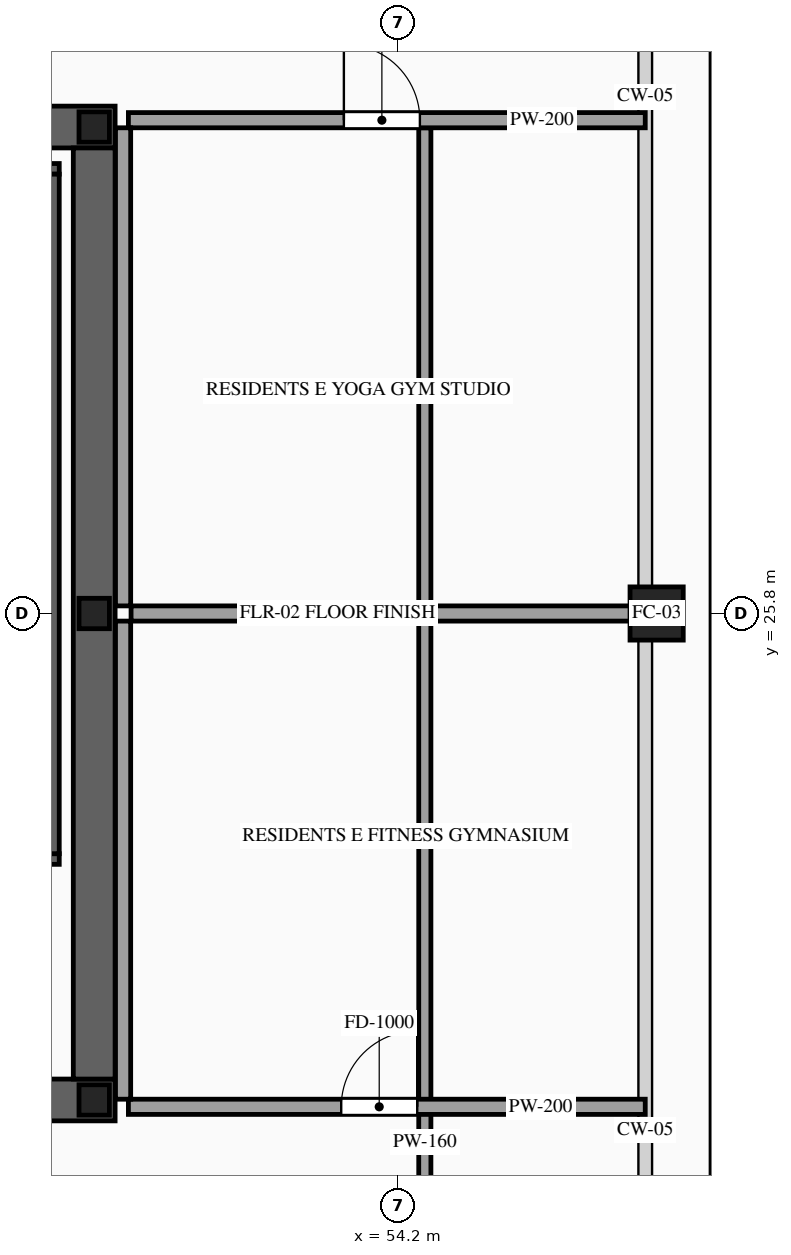
"""IFC4 building model, lengths in metres.
Left out: names, types, materials, properties, quantities, classifications, styles, units other than length and angle.
Written with IfcOpenShell. Run it as: python <this file> out.ifc"""

import sys

from ifc_helpers import new_model, si_unit, direction, frame, frame_2d, origin, origin_2d, place, context, subcontext, project, spatial, rectangle, hollow_rectangle, i_section, extrude, source, transform, mapped, element, fill, save


model = new_model("IFC4")
c1 = context("Model", 3, precision=1e-05, world=origin(), true_north=direction((0.0, 1.0)))
c2 = subcontext(c1, "Body", "Model", "MODEL_VIEW")
j1 = project(units=[si_unit("LENGTHUNIT", "METRE"), si_unit("PLANEANGLEUNIT", "RADIAN")], contexts=[c1])
p1 = place(None, origin())
s1 = spatial("IfcSite", under=j1, at=p1, CompositionType="ELEMENT")
p2 = place(p1, origin())
s2 = spatial("IfcBuilding", under=s1, at=p2, CompositionType="ELEMENT")
p3 = place(p2, frame((0.0, 0.0, 238.1)))
s3 = spatial("IfcBuildingStorey", under=s2, at=p3, CompositionType="ELEMENT", Elevation=238.1)
p4 = place(p3, frame((23.525, 19.4, 0.0), z_axis=(0.0, 0.0, 1.0), x_axis=(1.0, 0.0, 0.0)))
e1 = element("IfcWall", 1, at=p4, inside=s3, PredefinedType="SHEAR", context=c2, shape_type="SweptSolid", body=[
    extrude(rectangle(XDim=26.95, YDim=0.55, at=frame_2d((13.475, 0.0))), origin(), (0.0, 0.0, 1.0), 3.5),
])
p5 = place(p4, frame((1.925, 0.0, 0.0)))
e2 = element("IfcOpeningElement", 2, at=p5, cuts=e1, PredefinedType="OPENING", context=c2, shape_type="SweptSolid", body=[
    extrude(rectangle(XDim=1.1, YDim=2.2, at=frame_2d((0.55, 1.1))), frame((0.0, 0.29, 0.0), z_axis=(0.0, -1.0, 0.0), x_axis=(1.0, 0.0, 0.0)), (0.0, 0.0, 1.0), 0.58),
])
p6 = place(p4, frame((9.825, 0.0, 0.0)))
e3 = element("IfcOpeningElement", 3, at=p6, cuts=e1, PredefinedType="OPENING", context=c2, shape_type="SweptSolid", body=[
    extrude(rectangle(XDim=1.1, YDim=2.2, at=frame_2d((0.55, 1.1))), frame((0.0, 0.29, 0.0), z_axis=(0.0, -1.0, 0.0), x_axis=(1.0, 0.0, 0.0)), (0.0, 0.0, 1.0), 0.58),
])
p7 = place(p4, frame((23.025, 0.0, 0.0)))
e4 = element("IfcOpeningElement", 4, at=p7, cuts=e1, PredefinedType="OPENING", context=c2, shape_type="SweptSolid", body=[
    extrude(rectangle(XDim=1.1, YDim=2.2, at=frame_2d((0.55, 1.1))), frame((0.0, 0.29, 0.0), z_axis=(0.0, -1.0, 0.0), x_axis=(1.0, 0.0, 0.0)), (0.0, 0.0, 1.0), 0.58),
])
p8 = place(p4, frame((19.645, 0.0, 0.0)))
e5 = element("IfcOpeningElement", 5, at=p8, cuts=e1, PredefinedType="OPENING", context=c2, shape_type="SweptSolid", body=[
    extrude(rectangle(XDim=0.9, YDim=2.15, at=frame_2d((0.45, 1.075))), frame((0.0, 0.29, 0.0), z_axis=(0.0, -1.0, 0.0), x_axis=(1.0, 0.0, 0.0)), (0.0, 0.0, 1.0), 0.58),
])
p9 = place(p4, frame((18.205, 0.0, 0.0)))
e6 = element("IfcOpeningElement", 6, at=p9, cuts=e1, PredefinedType="OPENING", context=c2, shape_type="SweptSolid", body=[
    extrude(rectangle(XDim=0.9, YDim=2.15, at=frame_2d((0.45, 1.075))), frame((0.0, 0.29, 0.0), z_axis=(0.0, -1.0, 0.0), x_axis=(1.0, 0.0, 0.0)), (0.0, 0.0, 1.0), 0.58),
])
p10 = place(p3, frame((23.525, 32.2, 0.0), z_axis=(0.0, 0.0, 1.0), x_axis=(1.0, 0.0, 0.0)))
e7 = element("IfcWall", 7, at=p10, inside=s3, PredefinedType="SHEAR", context=c2, shape_type="SweptSolid", body=[
    extrude(rectangle(XDim=26.95, YDim=0.55, at=frame_2d((13.475, 0.0))), origin(), (0.0, 0.0, 1.0), 3.5),
])
p11 = place(p10, frame((4.545, 0.0, 0.0)))
e8 = element("IfcOpeningElement", 8, at=p11, cuts=e7, PredefinedType="OPENING", context=c2, shape_type="SweptSolid", body=[
    extrude(rectangle(XDim=0.9, YDim=2.15, at=frame_2d((0.45, 1.075))), frame((0.0, 0.29, 0.0), z_axis=(0.0, -1.0, 0.0), x_axis=(1.0, 0.0, 0.0)), (0.0, 0.0, 1.0), 0.58),
])
p12 = place(p10, frame((9.825, 0.0, 0.0)))
e9 = element("IfcOpeningElement", 9, at=p12, cuts=e7, PredefinedType="OPENING", context=c2, shape_type="SweptSolid", body=[
    extrude(rectangle(XDim=1.1, YDim=2.2, at=frame_2d((0.55, 1.1))), frame((0.0, 0.29, 0.0), z_axis=(0.0, -1.0, 0.0), x_axis=(1.0, 0.0, 0.0)), (0.0, 0.0, 1.0), 0.58),
])
p13 = place(p10, frame((15.675, 0.0, 0.0)))
e10 = element("IfcOpeningElement", 10, at=p13, cuts=e7, PredefinedType="OPENING", context=c2, shape_type="SweptSolid", body=[
    extrude(rectangle(XDim=1.1, YDim=2.2, at=frame_2d((0.55, 1.1))), frame((0.0, 0.29, 0.0), z_axis=(0.0, -1.0, 0.0), x_axis=(1.0, 0.0, 0.0)), (0.0, 0.0, 1.0), 0.58),
])
p14 = place(p10, frame((18.205, 0.0, 0.0)))
e11 = element("IfcOpeningElement", 11, at=p14, cuts=e7, PredefinedType="OPENING", context=c2, shape_type="SweptSolid", body=[
    extrude(rectangle(XDim=0.9, YDim=2.15, at=frame_2d((0.45, 1.075))), frame((0.0, 0.29, 0.0), z_axis=(0.0, -1.0, 0.0), x_axis=(1.0, 0.0, 0.0)), (0.0, 0.0, 1.0), 0.58),
])
p15 = place(p10, frame((19.645, 0.0, 0.0)))
e12 = element("IfcOpeningElement", 12, at=p15, cuts=e7, PredefinedType="OPENING", context=c2, shape_type="SweptSolid", body=[
    extrude(rectangle(XDim=0.9, YDim=2.15, at=frame_2d((0.45, 1.075))), frame((0.0, 0.29, 0.0), z_axis=(0.0, -1.0, 0.0), x_axis=(1.0, 0.0, 0.0)), (0.0, 0.0, 1.0), 0.58),
])
m1 = source(origin(), c2, "Body", "SweptSolid", [
    extrude(rectangle(XDim=12.25, YDim=0.55, at=frame_2d((6.125, 0.0))), origin(), (0.0, 0.0, 1.0), 3.5),
])
p16 = place(p3, frame((50.2, 19.675, 0.0), z_axis=(0.0, 0.0, 1.0), x_axis=(0.0, 1.0, 0.0)))
e13 = element("IfcWall", 13, at=p16, inside=s3, PredefinedType="SHEAR", context=c2, shape_type="MappedRepresentation", body=[
    mapped(m1, transform((0.0, 0.0, 0.0), scale=1.0)),
])
m2 = source(origin(), c2, "Body", "SweptSolid", [
    extrude(i_section(OverallWidth=0.4, OverallDepth=0.4, WebThickness=0.013, FlangeThickness=0.021, at=origin_2d()), origin(), (0.0, 0.0, 1.0), 3.5),
])
for number, where, z_axis, x_axis in (
    (14, (50.2, 19.4, 0.0), (0.0, 0.0, 1.0), (1.0, 0.0, 0.0)),
    (15, (50.2, 25.8, 0.0), (0.0, 0.0, 1.0), (1.0, 0.0, 0.0)),
    (16, (50.2, 32.2, 0.0), (0.0, 0.0, 1.0), (1.0, 0.0, 0.0)),
):
    element("IfcColumn", number, at=place(p3, frame(where, z_axis=z_axis, x_axis=x_axis)), inside=s3, PredefinedType="COLUMN", context=c2, shape_type="MappedRepresentation", body=[
        mapped(m2, transform((0.0, 0.0, 0.0), scale=1.0)),
    ])
m3 = source(origin(), c2, "Body", "SweptSolid", [
    extrude(hollow_rectangle(XDim=0.7, YDim=0.7, WallThickness=0.032, at=origin_2d()), origin(), (0.0, 0.0, 1.0), 3.5),
])
p17 = place(p3, frame((57.6, 25.8, 0.0), z_axis=(0.0, 0.0, 1.0), x_axis=(1.0, 0.0, 0.0)))
e17 = element("IfcColumn", 17, at=p17, inside=s3, PredefinedType="COLUMN", context=c2, shape_type="MappedRepresentation", body=[
    mapped(m3, transform((0.0, 0.0, 0.0), scale=1.0)),
])
p18 = place(p3, frame((46.46, 22.57, 0.0), z_axis=(0.0, 0.0, 1.0), x_axis=(1.0, 0.0, 0.0)))
e18 = element("IfcWall", 18, at=p18, inside=s3, PredefinedType="SOLIDWALL", context=c2, shape_type="SweptSolid", body=[
    extrude(rectangle(XDim=3.28, YDim=0.14, at=frame_2d((1.64, 0.0))), origin(), (0.0, 0.0, 1.0), 3.28),
])
p19 = place(p18, frame((1.09, 0.0, 0.0)))
e19 = element("IfcOpeningElement", 19, at=p19, cuts=e18, PredefinedType="OPENING", context=c2, shape_type="SweptSolid", body=[
    extrude(rectangle(XDim=1.1, YDim=2.2, at=frame_2d((0.55, 1.1))), frame((0.0, 0.085, 0.0), z_axis=(0.0, -1.0, 0.0), x_axis=(1.0, 0.0, 0.0)), (0.0, 0.0, 1.0), 0.17),
])
m4 = source(origin(), c2, "Body", "SweptSolid", [
    extrude(rectangle(XDim=3.28, YDim=0.14, at=frame_2d((1.64, 0.0))), origin(), (0.0, 0.0, 1.0), 3.28),
])
p20 = place(p3, frame((46.46, 31.65, 0.0), z_axis=(0.0, 0.0, 1.0), x_axis=(1.0, 0.0, 0.0)))
e20 = element("IfcWall", 20, at=p20, inside=s3, PredefinedType="SOLIDWALL", context=c2, shape_type="MappedRepresentation", body=[
    mapped(m4, transform((0.0, 0.0, 0.0), scale=1.0)),
])
m5 = source(origin(), c2, "Body", "SweptSolid", [
    extrude(rectangle(XDim=8.94, YDim=0.14, at=frame_2d((4.47, 0.0))), origin(), (0.0, 0.0, 1.0), 3.28),
])
p21 = place(p3, frame((49.67, 22.64, 0.0), z_axis=(0.0, 0.0, 1.0), x_axis=(0.0, 1.0, 0.0)))
e21 = element("IfcWall", 21, at=p21, inside=s3, PredefinedType="SOLIDWALL", context=c2, shape_type="MappedRepresentation", body=[
    mapped(m5, transform((0.0, 0.0, 0.0), scale=1.0)),
])
m6 = source(origin(), c2, "Body", "SweptSolid", [
    extrude(rectangle(XDim=26.69, YDim=0.16, at=frame_2d((13.345, 0.0))), origin(), (0.0, 0.0, 1.0), 3.28),
])
p22 = place(p3, frame((54.55, 5.5, 0.0), z_axis=(0.0, 0.0, 1.0), x_axis=(0.0, 1.0, 0.0)))
e22 = element("IfcWall", 22, at=p22, inside=s3, PredefinedType="PARTITIONING", context=c2, shape_type="MappedRepresentation", body=[
    mapped(m6, transform((0.0, 0.0, 0.0), scale=1.0)),
])
p23 = place(p3, frame((50.65, 19.31, 0.0), z_axis=(0.0, 0.0, 1.0), x_axis=(1.0, 0.0, 0.0)))
e23 = element("IfcWall", 23, at=p23, inside=s3, PredefinedType="PARTITIONING", context=c2, shape_type="SweptSolid", body=[
    extrude(rectangle(XDim=6.8, YDim=0.2, at=frame_2d((3.4, 0.0))), origin(), (0.0, 0.0, 1.0), 2.825),
])
p24 = place(p23, frame((2.8, 0.0, 0.0)))
e24 = element("IfcOpeningElement", 24, at=p24, cuts=e23, PredefinedType="OPENING", context=c2, shape_type="SweptSolid", body=[
    extrude(rectangle(XDim=1.0, YDim=2.2, at=frame_2d((0.5, 1.1))), frame((0.0, 0.115, 0.0), z_axis=(0.0, -1.0, 0.0), x_axis=(1.0, 0.0, 0.0)), (0.0, 0.0, 1.0), 0.23),
])
m7 = source(origin(), c2, "Body", "SweptSolid", [
    extrude(rectangle(XDim=6.765, YDim=0.2, at=frame_2d((3.382, 0.0))), origin(), (0.0, 0.0, 1.0), 2.787),
])
p25 = place(p3, frame((50.685, 25.8, 0.0), z_axis=(0.0, 0.0, 1.0), x_axis=(1.0, 0.0, 0.0)))
e25 = element("IfcWall", 25, at=p25, inside=s3, PredefinedType="PARTITIONING", context=c2, shape_type="MappedRepresentation", body=[
    mapped(m7, transform((0.0, 0.0, 0.0), scale=1.0)),
])
m8 = source(origin(), c2, "Body", "SweptSolid", [
    extrude(rectangle(XDim=6.29, YDim=0.2, at=frame_2d((3.145, 0.0))), origin(), (0.0, 0.0, 1.0), 3.28),
])
p26 = place(p3, frame((50.58, 19.41, 0.0), z_axis=(0.0, 0.0, 1.0), x_axis=(0.0, 1.0, 0.0)))
e26 = element("IfcWall", 26, at=p26, inside=s3, PredefinedType="PARTITIONING", context=c2, shape_type="MappedRepresentation", body=[
    mapped(m8, transform((0.0, 0.0, 0.0), scale=1.0)),
])
p27 = place(p3, frame((50.65, 32.29, 0.0), z_axis=(0.0, 0.0, 1.0), x_axis=(1.0, 0.0, 0.0)))
e27 = element("IfcWall", 27, at=p27, inside=s3, PredefinedType="PARTITIONING", context=c2, shape_type="SweptSolid", body=[
    extrude(rectangle(XDim=6.8, YDim=0.2, at=frame_2d((3.4, 0.0))), origin(), (0.0, 0.0, 1.0), 2.825),
])
p28 = place(p27, frame((2.835, 0.0, 0.0)))
e28 = element("IfcOpeningElement", 28, at=p28, cuts=e27, PredefinedType="OPENING", context=c2, shape_type="SweptSolid", body=[
    extrude(rectangle(XDim=1.0, YDim=2.2, at=frame_2d((0.5, 1.1))), frame((0.0, 0.115, 0.0), z_axis=(0.0, -1.0, 0.0), x_axis=(1.0, 0.0, 0.0)), (0.0, 0.0, 1.0), 0.23),
])
p29 = place(p3, frame((50.58, 25.9, 0.0), z_axis=(0.0, 0.0, 1.0), x_axis=(0.0, 1.0, 0.0)))
e29 = element("IfcWall", 29, at=p29, inside=s3, PredefinedType="PARTITIONING", context=c2, shape_type="MappedRepresentation", body=[
    mapped(m8, transform((0.0, 0.0, 0.0), scale=1.0)),
])
m9 = source(origin(), c2, "Body", "SweptSolid", [
    extrude(rectangle(XDim=1.0, YDim=2.2, at=frame_2d((0.5, 1.1))), frame((0.0, 0.025, 0.0), z_axis=(0.0, -1.0, 0.0), x_axis=(1.0, 0.0, 0.0)), (0.0, 0.0, 1.0), 0.05),
])
p30 = place(p24, origin())
e30 = element("IfcDoor", 30, at=p30, inside=s3, OperationType="SINGLE_SWING_RIGHT", PredefinedType="DOOR", context=c2, shape_type="MappedRepresentation", body=[
    mapped(m9, transform((0.0, 0.0, 0.0), scale=1.0)),
])
fill(e24, e30)
p31 = place(p28, origin())
e31 = element("IfcDoor", 31, at=p31, inside=s3, OperationType="SINGLE_SWING_LEFT", PredefinedType="DOOR", context=c2, shape_type="MappedRepresentation", body=[
    mapped(m9, transform((0.0, 0.0, 0.0), scale=1.0)),
])
fill(e28, e31)
save(model, sys.argv[1])
